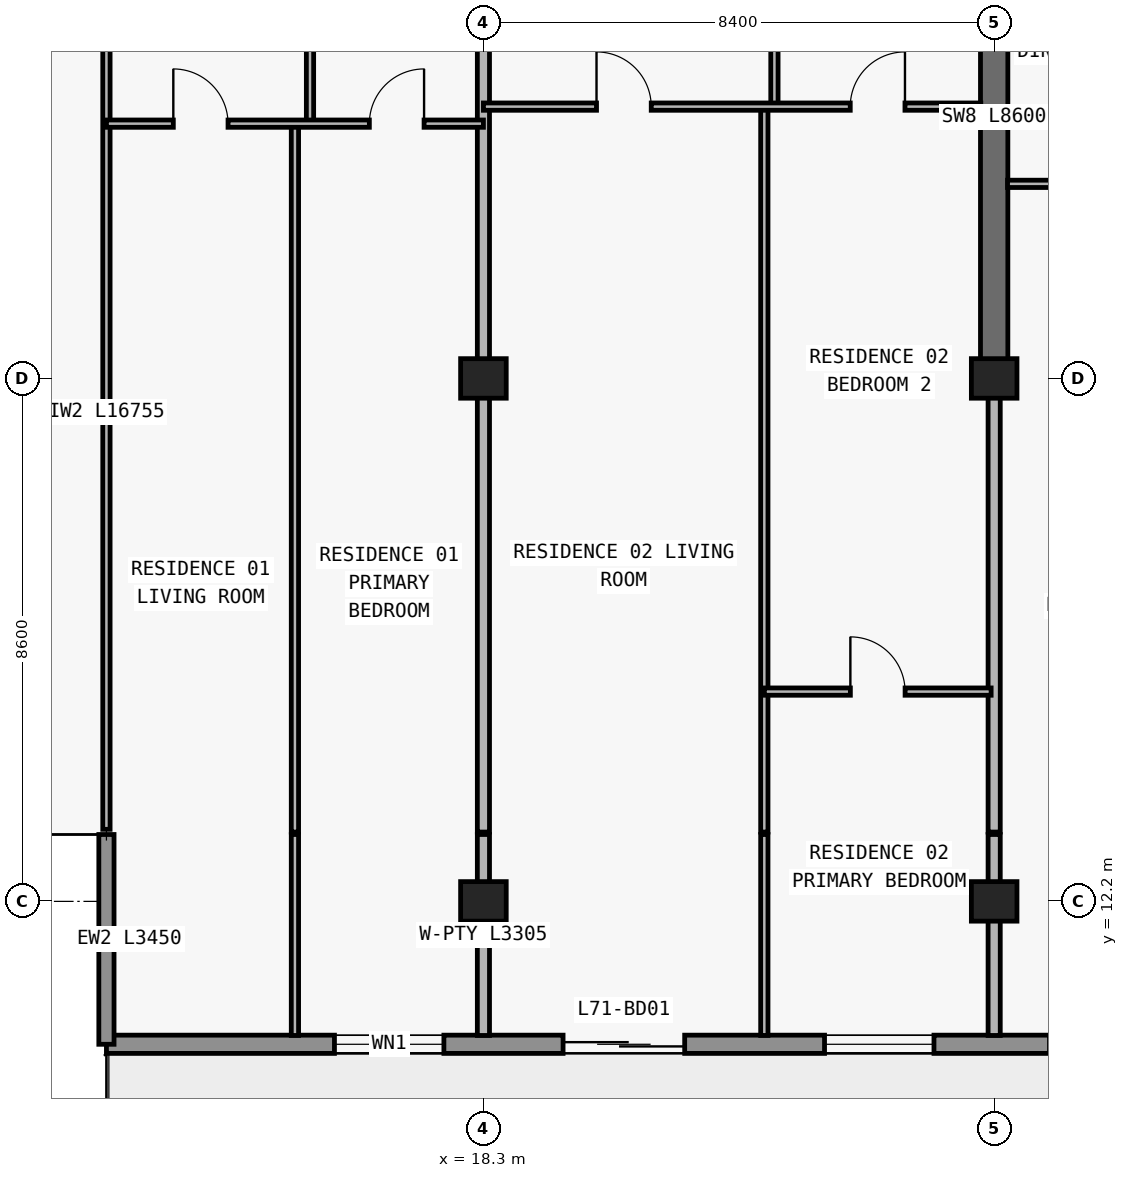
"""IFC4 building model, lengths in metres.
Left out: names, types, materials, properties, quantities, classifications, styles, units other than length and angle.
Written with IfcOpenShell. Run it as: python <this file> out.ifc"""

import sys

from ifc_helpers import new_model, si_unit, direction, frame, frame_2d, origin, origin_2d, place, context, subcontext, project, spatial, rectangle, extrude, element, fill, save


model = new_model("IFC4")
c1 = context("Model", 3, precision=1e-05, world=origin(), true_north=direction((0.0, 1.0)))
c2 = subcontext(c1, "Body", "Model", "MODEL_VIEW")
j1 = project(units=[si_unit("LENGTHUNIT", "METRE"), si_unit("PLANEANGLEUNIT", "RADIAN")], contexts=[c1])
p1 = place(None, origin())
s1 = spatial("IfcSite", under=j1, at=p1, CompositionType="ELEMENT")
p2 = place(p1, origin())
s2 = spatial("IfcBuilding", under=s1, at=p2, CompositionType="ELEMENT")
p3 = place(p2, frame((0.0, 0.0, 252.9)))
s3 = spatial("IfcBuildingStorey", under=s2, at=p3, CompositionType="ELEMENT", Elevation=252.9)
for number, where, z_axis, x_axis in (
    (1, (18.3, 12.2, 0.0), (0.0, 0.0, 1.0), (1.0, 0.0, 0.0)),
    (2, (26.7, 12.2, 0.0), (0.0, 0.0, 1.0), (1.0, 0.0, 0.0)),
    (3, (18.3, 20.8, 0.0), (0.0, 0.0, 1.0), (1.0, 0.0, 0.0)),
    (4, (26.7, 20.8, 0.0), (0.0, 0.0, 1.0), (1.0, 0.0, 0.0)),
):
    element("IfcColumn", number, at=place(p3, frame(where, z_axis=z_axis, x_axis=x_axis)), inside=s3, PredefinedType="COLUMN", context=c2, shape_type="SweptSolid", body=[
        extrude(rectangle(XDim=0.75, YDim=0.65, at=origin_2d()), origin(), (0.0, 0.0, 1.0), 3.05),
    ])
p4 = place(p3, frame((26.7, 20.8, 0.0), z_axis=(0.0, 0.0, 1.0), x_axis=(0.0, 1.0, 0.0)))
e5 = element("IfcWall", 5, at=p4, inside=s3, PredefinedType="SHEAR", context=c2, shape_type="SweptSolid", body=[
    extrude(rectangle(XDim=8.6, YDim=0.45, at=frame_2d((4.3, 0.0))), origin(), (0.0, 0.0, 1.0), 3.05),
])
p5 = place(p3, frame((65.7, 9.85, 0.0), z_axis=(0.0, 0.0, 1.0), x_axis=(-1.0, 0.0, 0.0)))
e6 = element("IfcWall", 6, at=p5, inside=s3, PredefinedType="STANDARD", context=c2, shape_type="SweptSolid", body=[
    extrude(rectangle(XDim=53.6, YDim=0.3, at=frame_2d((26.8, 0.0))), origin(), (0.0, 0.0, 1.0), 3.05),
])
p6 = place(p5, frame((48.05, 0.0, 0.85)))
e7 = element("IfcOpeningElement", 7, at=p6, cuts=e6, PredefinedType="OPENING", context=c2, shape_type="SweptSolid", body=[
    extrude(rectangle(XDim=1.8, YDim=1.55, at=frame_2d((0.9, 0.775))), frame((0.0, 0.16, 0.0), z_axis=(0.0, -1.0, 0.0), x_axis=(1.0, 0.0, 0.0)), (0.0, 0.0, 1.0), 0.32),
])
p7 = place(p5, frame((44.09, 0.0, 0.0)))
e8 = element("IfcOpeningElement", 8, at=p7, cuts=e6, PredefinedType="OPENING", context=c2, shape_type="SweptSolid", body=[
    extrude(rectangle(XDim=2.0, YDim=2.3, at=frame_2d((1.0, 1.15))), frame((0.0, 0.16, 0.0), z_axis=(0.0, -1.0, 0.0), x_axis=(1.0, 0.0, 0.0)), (0.0, 0.0, 1.0), 0.32),
])
p8 = place(p5, frame((39.99, 0.0, 0.85)))
e9 = element("IfcOpeningElement", 9, at=p8, cuts=e6, PredefinedType="OPENING", context=c2, shape_type="SweptSolid", body=[
    extrude(rectangle(XDim=1.8, YDim=1.55, at=frame_2d((0.9, 0.775))), frame((0.0, 0.16, 0.0), z_axis=(0.0, -1.0, 0.0), x_axis=(1.0, 0.0, 0.0)), (0.0, 0.0, 1.0), 0.32),
])
p9 = place(p5, frame((36.09, 0.0, 0.0)))
e10 = element("IfcOpeningElement", 10, at=p9, cuts=e6, PredefinedType="OPENING", context=c2, shape_type="SweptSolid", body=[
    extrude(rectangle(XDim=2.0, YDim=2.3, at=frame_2d((1.0, 1.15))), frame((0.0, 0.16, 0.0), z_axis=(0.0, -1.0, 0.0), x_axis=(1.0, 0.0, 0.0)), (0.0, 0.0, 1.0), 0.32),
])
p10 = place(p5, frame((31.41, 0.0, 0.65)))
e11 = element("IfcOpeningElement", 11, at=p10, cuts=e6, PredefinedType="OPENING", context=c2, shape_type="SweptSolid", body=[
    extrude(rectangle(XDim=2.6, YDim=1.85, at=frame_2d((1.3, 0.925))), frame((0.0, 0.16, 0.0), z_axis=(0.0, -1.0, 0.0), x_axis=(1.0, 0.0, 0.0)), (0.0, 0.0, 1.0), 0.32),
])
p11 = place(p5, frame((25.7, 0.0, 0.85)))
e12 = element("IfcOpeningElement", 12, at=p11, cuts=e6, PredefinedType="OPENING", context=c2, shape_type="SweptSolid", body=[
    extrude(rectangle(XDim=2.2, YDim=1.55, at=frame_2d((1.1, 0.775))), frame((0.0, 0.16, 0.0), z_axis=(0.0, -1.0, 0.0), x_axis=(1.0, 0.0, 0.0)), (0.0, 0.0, 1.0), 0.32),
])
p12 = place(p5, frame((17.7, 0.0, 0.85)))
e13 = element("IfcOpeningElement", 13, at=p12, cuts=e6, PredefinedType="OPENING", context=c2, shape_type="SweptSolid", body=[
    extrude(rectangle(XDim=2.2, YDim=1.55, at=frame_2d((1.1, 0.775))), frame((0.0, 0.16, 0.0), z_axis=(0.0, -1.0, 0.0), x_axis=(1.0, 0.0, 0.0)), (0.0, 0.0, 1.0), 0.32),
])
p13 = place(p5, frame((11.69, 0.0, 0.0)))
e14 = element("IfcOpeningElement", 14, at=p13, cuts=e6, PredefinedType="OPENING", context=c2, shape_type="SweptSolid", body=[
    extrude(rectangle(XDim=2.0, YDim=2.3, at=frame_2d((1.0, 1.15))), frame((0.0, 0.16, 0.0), z_axis=(0.0, -1.0, 0.0), x_axis=(1.0, 0.0, 0.0)), (0.0, 0.0, 1.0), 0.32),
])
p14 = place(p5, frame((7.01, 0.0, 0.65)))
e15 = element("IfcOpeningElement", 15, at=p14, cuts=e6, PredefinedType="OPENING", context=c2, shape_type="SweptSolid", body=[
    extrude(rectangle(XDim=2.6, YDim=1.85, at=frame_2d((1.3, 0.925))), frame((0.0, 0.16, 0.0), z_axis=(0.0, -1.0, 0.0), x_axis=(1.0, 0.0, 0.0)), (0.0, 0.0, 1.0), 0.32),
])
p15 = place(p5, frame((2.0, 0.0, 0.85)))
e16 = element("IfcOpeningElement", 16, at=p15, cuts=e6, PredefinedType="OPENING", context=c2, shape_type="SweptSolid", body=[
    extrude(rectangle(XDim=2.2, YDim=1.55, at=frame_2d((1.1, 0.775))), frame((0.0, 0.16, 0.0), z_axis=(0.0, -1.0, 0.0), x_axis=(1.0, 0.0, 0.0)), (0.0, 0.0, 1.0), 0.32),
])
p16 = place(p3, frame((12.1, 13.3, 0.0), z_axis=(0.0, 0.0, 1.0), x_axis=(0.0, -1.0, 0.0)))
e17 = element("IfcWall", 17, at=p16, inside=s3, PredefinedType="ELEMENTEDWALL", context=c2, shape_type="SweptSolid", body=[
    extrude(rectangle(XDim=3.45, YDim=0.25, at=frame_2d((1.725, 0.0))), origin(), (0.0, 0.0, 1.0), 3.05),
])
p17 = place(p3, frame((12.1, 13.385, 0.0), z_axis=(0.0, 0.0, 1.0), x_axis=(0.0, 1.0, 0.0)))
e18 = element("IfcWall", 18, at=p17, inside=s3, PredefinedType="PARTITIONING", context=c2, shape_type="SweptSolid", body=[
    extrude(rectangle(XDim=16.755, YDim=0.12, at=frame_2d((8.377, 0.0))), origin(), (0.0, 0.0, 1.0), 3.05),
])
p18 = place(p17, frame((13.73, 0.0, 0.0)))
e19 = element("IfcOpeningElement", 19, at=p18, cuts=e18, PredefinedType="OPENING", context=c2, shape_type="SweptSolid", body=[
    extrude(rectangle(XDim=0.9, YDim=2.15, at=frame_2d((0.45, 1.075))), frame((0.0, 0.07, 0.0), z_axis=(0.0, -1.0, 0.0), x_axis=(1.0, 0.0, 0.0)), (0.0, 0.0, 1.0), 0.14),
])
p19 = place(p3, frame((15.2, 9.995, 0.0), z_axis=(0.0, 0.0, 1.0), x_axis=(0.0, 1.0, 0.0)))
e20 = element("IfcWall", 20, at=p19, inside=s3, PredefinedType="PARTITIONING", context=c2, shape_type="SweptSolid", body=[
    extrude(rectangle(XDim=3.305, YDim=0.12, at=frame_2d((1.652, 0.0))), origin(), (0.0, 0.0, 1.0), 3.05),
])
p20 = place(p3, frame((15.2, 13.34, 0.0), z_axis=(0.0, 0.0, 1.0), x_axis=(0.0, 1.0, 0.0)))
e21 = element("IfcWall", 21, at=p20, inside=s3, PredefinedType="PARTITIONING", context=c2, shape_type="SweptSolid", body=[
    extrude(rectangle(XDim=11.65, YDim=0.12, at=frame_2d((5.825, 0.0))), origin(), (0.0, 0.0, 1.0), 3.05),
])
p21 = place(p3, frame((15.448, 24.99, 0.0), z_axis=(0.0, 0.0, 1.0), x_axis=(0.0, 1.0, 0.0)))
e22 = element("IfcWall", 22, at=p21, inside=s3, PredefinedType="PARTITIONING", context=c2, shape_type="SweptSolid", body=[
    extrude(rectangle(XDim=5.15, YDim=0.12, at=frame_2d((2.575, 0.0))), origin(), (0.0, 0.0, 1.0), 3.05),
])
p22 = place(p21, frame((2.125, 0.0, 0.0)))
e23 = element("IfcOpeningElement", 23, at=p22, cuts=e22, PredefinedType="OPENING", context=c2, shape_type="SweptSolid", body=[
    extrude(rectangle(XDim=0.9, YDim=2.15, at=frame_2d((0.45, 1.075))), frame((0.0, 0.07, 0.0), z_axis=(0.0, -1.0, 0.0), x_axis=(1.0, 0.0, 0.0)), (0.0, 0.0, 1.0), 0.14),
])
p23 = place(p3, frame((18.3, 9.995, 0.0), z_axis=(0.0, 0.0, 1.0), x_axis=(0.0, 1.0, 0.0)))
e24 = element("IfcWall", 24, at=p23, inside=s3, PredefinedType="PARTITIONING", context=c2, shape_type="SweptSolid", body=[
    extrude(rectangle(XDim=3.305, YDim=0.2, at=frame_2d((1.652, 0.0))), origin(), (0.0, 0.0, 1.0), 2.263),
])
p24 = place(p3, frame((18.3, 13.34, 0.0), z_axis=(0.0, 0.0, 1.0), x_axis=(0.0, 1.0, 0.0)))
e25 = element("IfcWall", 25, at=p24, inside=s3, PredefinedType="PARTITIONING", context=c2, shape_type="SweptSolid", body=[
    extrude(rectangle(XDim=16.8, YDim=0.2, at=frame_2d((8.4, 0.0))), origin(), (0.0, 0.0, 1.0), 2.263),
])
p25 = place(p3, frame((22.92, 9.995, 0.0), z_axis=(0.0, 0.0, 1.0), x_axis=(0.0, 1.0, 0.0)))
e26 = element("IfcWall", 26, at=p25, inside=s3, PredefinedType="PARTITIONING", context=c2, shape_type="SweptSolid", body=[
    extrude(rectangle(XDim=3.305, YDim=0.12, at=frame_2d((1.652, 0.0))), origin(), (0.0, 0.0, 1.0), 3.05),
])
p26 = place(p3, frame((22.92, 13.34, 0.0), z_axis=(0.0, 0.0, 1.0), x_axis=(0.0, 1.0, 0.0)))
e27 = element("IfcWall", 27, at=p26, inside=s3, PredefinedType="PARTITIONING", context=c2, shape_type="SweptSolid", body=[
    extrude(rectangle(XDim=11.93, YDim=0.12, at=frame_2d((5.965, 0.0))), origin(), (0.0, 0.0, 1.0), 3.05),
])
p27 = place(p3, frame((23.086, 25.275, 0.0), z_axis=(0.0, 0.0, 1.0), x_axis=(0.0, 1.0, 0.0)))
e28 = element("IfcWall", 28, at=p27, inside=s3, PredefinedType="PARTITIONING", context=c2, shape_type="SweptSolid", body=[
    extrude(rectangle(XDim=4.865, YDim=0.12, at=frame_2d((2.433, 0.0))), origin(), (0.0, 0.0, 1.0), 3.05),
])
p28 = place(p27, frame((1.982, 0.0, 0.0)))
e29 = element("IfcOpeningElement", 29, at=p28, cuts=e28, PredefinedType="OPENING", context=c2, shape_type="SweptSolid", body=[
    extrude(rectangle(XDim=0.9, YDim=2.15, at=frame_2d((0.45, 1.075))), frame((0.0, 0.07, 0.0), z_axis=(0.0, -1.0, 0.0), x_axis=(1.0, 0.0, 0.0)), (0.0, 0.0, 1.0), 0.14),
])
p29 = place(p3, frame((26.7, 9.995, 0.0), z_axis=(0.0, 0.0, 1.0), x_axis=(0.0, 1.0, 0.0)))
e30 = element("IfcWall", 30, at=p29, inside=s3, PredefinedType="PARTITIONING", context=c2, shape_type="SweptSolid", body=[
    extrude(rectangle(XDim=3.305, YDim=0.2, at=frame_2d((1.652, 0.0))), origin(), (0.0, 0.0, 1.0), 2.263),
])
p30 = place(p3, frame((26.7, 13.34, 0.0), z_axis=(0.0, 0.0, 1.0), x_axis=(0.0, 1.0, 0.0)))
e31 = element("IfcWall", 31, at=p30, inside=s3, PredefinedType="PARTITIONING", context=c2, shape_type="SweptSolid", body=[
    extrude(rectangle(XDim=7.455, YDim=0.2, at=frame_2d((3.728, 0.0))), origin(), (0.0, 0.0, 1.0), 2.263),
])
p31 = place(p3, frame((22.92, 15.65, 0.0), z_axis=(0.0, 0.0, 1.0), x_axis=(1.0, 0.0, 0.0)))
e32 = element("IfcWall", 32, at=p31, inside=s3, PredefinedType="PARTITIONING", context=c2, shape_type="SweptSolid", body=[
    extrude(rectangle(XDim=3.73, YDim=0.12, at=frame_2d((1.865, 0.0))), origin(), (0.0, 0.0, 1.0), 3.05),
])
p32 = place(p31, frame((1.415, 0.0, 0.0)))
e33 = element("IfcOpeningElement", 33, at=p32, cuts=e32, PredefinedType="OPENING", context=c2, shape_type="SweptSolid", body=[
    extrude(rectangle(XDim=0.9, YDim=2.15, at=frame_2d((0.45, 1.075))), frame((0.0, 0.07, 0.0), z_axis=(0.0, -1.0, 0.0), x_axis=(1.0, 0.0, 0.0)), (0.0, 0.0, 1.0), 0.14),
])
p33 = place(p3, frame((26.92, 24.0, 0.0), z_axis=(0.0, 0.0, 1.0), x_axis=(1.0, 0.0, 0.0)))
e34 = element("IfcWall", 34, at=p33, inside=s3, PredefinedType="PARTITIONING", context=c2, shape_type="SweptSolid", body=[
    extrude(rectangle(XDim=8.18, YDim=0.12, at=frame_2d((4.09, 0.0))), origin(), (0.0, 0.0, 1.0), 3.05),
])
p34 = place(p33, frame((1.33, 0.0, 0.0)))
e35 = element("IfcOpeningElement", 35, at=p34, cuts=e34, PredefinedType="OPENING", context=c2, shape_type="SweptSolid", body=[
    extrude(rectangle(XDim=0.9, YDim=2.15, at=frame_2d((0.45, 1.075))), frame((0.0, 0.07, 0.0), z_axis=(0.0, -1.0, 0.0), x_axis=(1.0, 0.0, 0.0)), (0.0, 0.0, 1.0), 0.14),
])
p35 = place(p3, frame((12.1, 24.99, 0.0), z_axis=(0.0, 0.0, 1.0), x_axis=(1.0, 0.0, 0.0)))
e36 = element("IfcWall", 36, at=p35, inside=s3, PredefinedType="PARTITIONING", context=c2, shape_type="SweptSolid", body=[
    extrude(rectangle(XDim=6.2, YDim=0.12, at=frame_2d((3.1, 0.0))), origin(), (0.0, 0.0, 1.0), 3.05),
])
p36 = place(p35, frame((1.1, 0.0, 0.0)))
e37 = element("IfcOpeningElement", 37, at=p36, cuts=e36, PredefinedType="OPENING", context=c2, shape_type="SweptSolid", body=[
    extrude(rectangle(XDim=0.9, YDim=2.15, at=frame_2d((0.45, 1.075))), frame((0.0, 0.07, 0.0), z_axis=(0.0, -1.0, 0.0), x_axis=(1.0, 0.0, 0.0)), (0.0, 0.0, 1.0), 0.14),
])
p37 = place(p35, frame((4.324, 0.0, 0.0)))
e38 = element("IfcOpeningElement", 38, at=p37, cuts=e36, PredefinedType="OPENING", context=c2, shape_type="SweptSolid", body=[
    extrude(rectangle(XDim=0.9, YDim=2.15, at=frame_2d((0.45, 1.075))), frame((0.0, 0.07, 0.0), z_axis=(0.0, -1.0, 0.0), x_axis=(1.0, 0.0, 0.0)), (0.0, 0.0, 1.0), 0.14),
])
p38 = place(p3, frame((18.3, 25.27, 0.0), z_axis=(0.0, 0.0, 1.0), x_axis=(1.0, 0.0, 0.0)))
e39 = element("IfcWall", 39, at=p38, inside=s3, PredefinedType="PARTITIONING", context=c2, shape_type="SweptSolid", body=[
    extrude(rectangle(XDim=8.18, YDim=0.12, at=frame_2d((4.09, 0.0))), origin(), (0.0, 0.0, 1.0), 3.05),
])
p39 = place(p38, frame((1.86, 0.0, 0.0)))
e40 = element("IfcOpeningElement", 40, at=p39, cuts=e39, PredefinedType="OPENING", context=c2, shape_type="SweptSolid", body=[
    extrude(rectangle(XDim=0.9, YDim=2.15, at=frame_2d((0.45, 1.075))), frame((0.0, 0.07, 0.0), z_axis=(0.0, -1.0, 0.0), x_axis=(1.0, 0.0, 0.0)), (0.0, 0.0, 1.0), 0.14),
])
p40 = place(p38, frame((6.033, 0.0, 0.0)))
e41 = element("IfcOpeningElement", 41, at=p40, cuts=e39, PredefinedType="OPENING", context=c2, shape_type="SweptSolid", body=[
    extrude(rectangle(XDim=0.9, YDim=2.15, at=frame_2d((0.45, 1.075))), frame((0.0, 0.07, 0.0), z_axis=(0.0, -1.0, 0.0), x_axis=(1.0, 0.0, 0.0)), (0.0, 0.0, 1.0), 0.14),
])
p41 = place(p6, origin())
e42 = element("IfcWindow", 42, at=p41, inside=s3, PartitioningType="SINGLE_PANEL", PredefinedType="WINDOW", context=c2, shape_type="SweptSolid", body=[
    extrude(rectangle(XDim=1.8, YDim=1.55, at=frame_2d((0.9, 0.775))), frame((0.0, 0.03, 0.0), z_axis=(0.0, -1.0, 0.0), x_axis=(1.0, 0.0, 0.0)), (0.0, 0.0, 1.0), 0.06),
])
fill(e7, e42)
p42 = place(p7, origin())
e43 = element("IfcDoor", 43, at=p42, inside=s3, OperationType="DOUBLE_DOOR_SLIDING", PredefinedType="DOOR", context=c2, shape_type="SweptSolid", body=[
    extrude(rectangle(XDim=2.0, YDim=2.3, at=frame_2d((1.0, 1.15))), frame((0.0, 0.025, 0.0), z_axis=(0.0, -1.0, 0.0), x_axis=(1.0, 0.0, 0.0)), (0.0, 0.0, 1.0), 0.05),
])
fill(e8, e43)
p43 = place(p8, origin())
e44 = element("IfcWindow", 44, at=p43, inside=s3, PartitioningType="SINGLE_PANEL", PredefinedType="WINDOW", context=c2, shape_type="SweptSolid", body=[
    extrude(rectangle(XDim=1.8, YDim=1.55, at=frame_2d((0.9, 0.775))), frame((0.0, 0.03, 0.0), z_axis=(0.0, -1.0, 0.0), x_axis=(1.0, 0.0, 0.0)), (0.0, 0.0, 1.0), 0.06),
])
fill(e9, e44)
p44 = place(p36, origin())
e45 = element("IfcDoor", 45, at=p44, inside=s3, OperationType="SINGLE_SWING_LEFT", PredefinedType="DOOR", context=c2, shape_type="SweptSolid", body=[
    extrude(rectangle(XDim=0.9, YDim=2.15, at=frame_2d((0.45, 1.075))), frame((0.0, 0.025, 0.0), z_axis=(0.0, -1.0, 0.0), x_axis=(1.0, 0.0, 0.0)), (0.0, 0.0, 1.0), 0.05),
])
fill(e37, e45)
p45 = place(p37, origin())
e46 = element("IfcDoor", 46, at=p45, inside=s3, OperationType="SINGLE_SWING_RIGHT", PredefinedType="DOOR", context=c2, shape_type="SweptSolid", body=[
    extrude(rectangle(XDim=0.9, YDim=2.15, at=frame_2d((0.45, 1.075))), frame((0.0, 0.025, 0.0), z_axis=(0.0, -1.0, 0.0), x_axis=(1.0, 0.0, 0.0)), (0.0, 0.0, 1.0), 0.05),
])
fill(e38, e46)
p46 = place(p39, origin())
e47 = element("IfcDoor", 47, at=p46, inside=s3, OperationType="SINGLE_SWING_LEFT", PredefinedType="DOOR", context=c2, shape_type="SweptSolid", body=[
    extrude(rectangle(XDim=0.9, YDim=2.15, at=frame_2d((0.45, 1.075))), frame((0.0, 0.025, 0.0), z_axis=(0.0, -1.0, 0.0), x_axis=(1.0, 0.0, 0.0)), (0.0, 0.0, 1.0), 0.05),
])
fill(e40, e47)
p47 = place(p40, origin())
e48 = element("IfcDoor", 48, at=p47, inside=s3, OperationType="SINGLE_SWING_RIGHT", PredefinedType="DOOR", context=c2, shape_type="SweptSolid", body=[
    extrude(rectangle(XDim=0.9, YDim=2.15, at=frame_2d((0.45, 1.075))), frame((0.0, 0.025, 0.0), z_axis=(0.0, -1.0, 0.0), x_axis=(1.0, 0.0, 0.0)), (0.0, 0.0, 1.0), 0.05),
])
fill(e41, e48)
p48 = place(p32, origin())
e49 = element("IfcDoor", 49, at=p48, inside=s3, OperationType="SINGLE_SWING_LEFT", PredefinedType="DOOR", context=c2, shape_type="SweptSolid", body=[
    extrude(rectangle(XDim=0.9, YDim=2.15, at=frame_2d((0.45, 1.075))), frame((0.0, 0.025, 0.0), z_axis=(0.0, -1.0, 0.0), x_axis=(1.0, 0.0, 0.0)), (0.0, 0.0, 1.0), 0.05),
])
fill(e33, e49)
save(model, sys.argv[1])
